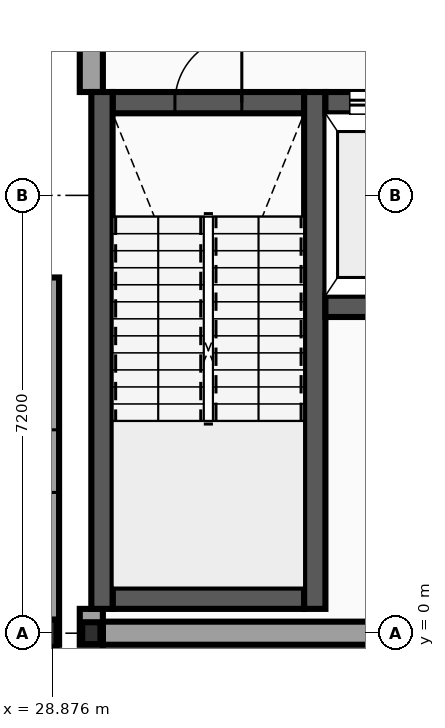
"""IFC4 building model, lengths in metres.
Left out: names, types, materials, properties, quantities, classifications, styles, units other than length and angle.
Written with IfcOpenShell. Run it as: python <this file> out.ifc"""

import sys

from ifc_helpers import new_model, si_unit, direction, frame, frame_2d, origin, origin_2d, place, context, subcontext, project, spatial, rectangle, i_section, extrude, element, fill, save


model = new_model("IFC4")
c1 = context("Model", 3, precision=1e-05, world=origin(), true_north=direction((0.0, 1.0)))
c2 = subcontext(c1, "Body", "Model", "MODEL_VIEW")
j1 = project(units=[si_unit("LENGTHUNIT", "METRE"), si_unit("PLANEANGLEUNIT", "RADIAN")], contexts=[c1])
p1 = place(None, origin())
s1 = spatial("IfcSite", under=j1, at=p1, CompositionType="ELEMENT")
p2 = place(p1, origin())
s2 = spatial("IfcBuilding", under=s1, at=p2, CompositionType="ELEMENT")
p3 = place(p2, frame((0.0, 0.0, 9.6)))
s3 = spatial("IfcBuildingStorey", under=s2, at=p3, CompositionType="ELEMENT", Elevation=9.6)
p4 = place(p3, frame((28.8, 0.0, 0.0), z_axis=(0.0, 0.0, 1.0), x_axis=(1.0, 0.0, 0.0)))
e1 = element("IfcColumn", 1, at=p4, inside=s3, PredefinedType="COLUMN", context=c2, shape_type="SweptSolid", body=[
    extrude(i_section(OverallWidth=0.3, OverallDepth=0.45, WebThickness=0.014, FlangeThickness=0.026, FilletRadius=0.027, at=origin_2d()), origin(), (0.0, 0.0, 1.0), 4.4),
])
p5 = place(p3, frame((29.52, 0.0, 0.0), z_axis=(0.0, 0.0, 1.0), x_axis=(1.0, 0.0, 0.0)))
e2 = element("IfcColumn", 2, at=p5, inside=s3, PredefinedType="COLUMN", context=c2, shape_type="SweptSolid", body=[
    extrude(i_section(OverallWidth=0.3, OverallDepth=0.36, WebThickness=0.012, FlangeThickness=0.022, FilletRadius=0.027, at=origin_2d()), origin(), (0.0, 0.0, 1.0), 4.4),
])
p6 = place(p3, frame((28.8, -0.19, 0.0), z_axis=(0.0, 0.0, 1.0), x_axis=(0.0, 1.0, 0.0)))
e3 = element("IfcWall", 3, at=p6, inside=s3, PredefinedType="STANDARD", context=c2, shape_type="SweptSolid", body=[
    extrude(rectangle(XDim=6.04, YDim=0.38, at=frame_2d((3.02, 0.0))), origin(), (0.0, 0.0, 1.0), 4.2),
])
p7 = place(p6, frame((2.505, 0.0, 0.95)))
e4 = element("IfcOpeningElement", 4, at=p7, cuts=e3, PredefinedType="OPENING", context=c2, shape_type="SweptSolid", body=[
    extrude(rectangle(XDim=1.03, YDim=1.332, at=frame_2d((0.515, 0.666))), frame((0.0, 0.2, 0.0), z_axis=(0.0, -1.0, 0.0), x_axis=(1.0, 0.0, 0.0)), (0.0, 0.0, 1.0), 0.4),
])
p8 = place(p3, frame((29.71, 0.0, 0.0), z_axis=(0.0, 0.0, 1.0), x_axis=(1.0, 0.0, 0.0)))
e5 = element("IfcWall", 5, at=p8, inside=s3, PredefinedType="STANDARD", context=c2, shape_type="SweptSolid", body=[
    extrude(rectangle(XDim=6.4, YDim=0.38, at=frame_2d((3.2, 0.0))), origin(), (0.0, 0.0, 1.0), 3.895),
])
p9 = place(p3, frame((29.52, 0.4, 0.0), z_axis=(0.0, 0.0, 1.0), x_axis=(0.0, -1.0, 0.0)))
e6 = element("IfcWall", 6, at=p9, inside=s3, PredefinedType="STANDARD", context=c2, shape_type="SweptSolid", body=[
    extrude(rectangle(XDim=0.59, YDim=0.38, at=frame_2d((0.295, 0.0))), origin(), (0.0, 0.0, 1.0), 4.2),
])
p10 = place(p3, frame((29.52, 14.4, 0.0), z_axis=(0.0, 0.0, 1.0), x_axis=(0.0, -1.0, 0.0)))
e7 = element("IfcWall", 7, at=p10, inside=s3, PredefinedType="STANDARD", context=c2, shape_type="SweptSolid", body=[
    extrude(rectangle(XDim=5.5, YDim=0.38, at=frame_2d((2.75, 0.0))), origin(), (0.0, 0.0, 1.0), 4.2),
])
p11 = place(p3, frame((29.87, 0.575, 0.0), z_axis=(0.0, 0.0, 1.0), x_axis=(1.0, 0.0, 0.0)))
e8 = element("IfcWall", 8, at=p11, inside=s3, PredefinedType="SHEAR", context=c2, shape_type="SweptSolid", body=[
    extrude(rectangle(XDim=3.15, YDim=0.35, at=frame_2d((1.575, 0.0))), origin(), (0.0, 0.0, 1.0), 4.2),
])
p12 = place(p3, frame((29.87, 8.725, 0.0), z_axis=(0.0, 0.0, 1.0), x_axis=(1.0, 0.0, 0.0)))
e9 = element("IfcWall", 9, at=p12, inside=s3, PredefinedType="SHEAR", context=c2, shape_type="SweptSolid", body=[
    extrude(rectangle(XDim=3.15, YDim=0.35, at=frame_2d((1.575, 0.0))), origin(), (0.0, 0.0, 1.0), 4.2),
])
p13 = place(p12, frame((1.025, 0.0, 0.0)))
e10 = element("IfcOpeningElement", 10, at=p13, cuts=e9, PredefinedType="OPENING", context=c2, shape_type="SweptSolid", body=[
    extrude(rectangle(XDim=1.1, YDim=2.15, at=frame_2d((0.55, 1.075))), frame((0.0, 0.185, 0.0), z_axis=(0.0, -1.0, 0.0), x_axis=(1.0, 0.0, 0.0)), (0.0, 0.0, 1.0), 0.37),
])
for number, where, z_axis, x_axis in (
    (11, (29.695, 0.4, 0.0), (0.0, 0.0, 1.0), (0.0, 1.0, 0.0)),
    (12, (33.195, 0.4, 0.0), (0.0, 0.0, 1.0), (0.0, 1.0, 0.0)),
):
    element("IfcWall", number, at=place(p3, frame(where, z_axis=z_axis, x_axis=x_axis)), inside=s3, PredefinedType="SHEAR", context=c2, shape_type="SweptSolid", body=[
        extrude(rectangle(XDim=8.5, YDim=0.35, at=frame_2d((4.25, 0.0))), origin(), (0.0, 0.0, 1.0), 4.2),
    ])
p14 = place(p3, frame((33.37, 5.375, 0.0), z_axis=(0.0, 0.0, 1.0), x_axis=(1.0, 0.0, 0.0)))
e13 = element("IfcWall", 13, at=p14, inside=s3, PredefinedType="SHEAR", context=c2, shape_type="SweptSolid", body=[
    extrude(rectangle(XDim=2.0, YDim=0.35, at=frame_2d((1.0, 0.0))), origin(), (0.0, 0.0, 1.0), 4.2),
])
p15 = place(p3, frame((33.37, 8.725, 0.0), z_axis=(0.0, 0.0, 1.0), x_axis=(1.0, 0.0, 0.0)))
e14 = element("IfcWall", 14, at=p15, inside=s3, PredefinedType="SHEAR", context=c2, shape_type="SweptSolid", body=[
    extrude(rectangle(XDim=2.0, YDim=0.35, at=frame_2d((1.0, 0.0))), origin(), (0.0, 0.0, 1.0), 4.2),
])
p16 = place(p15, frame((0.4, 0.0, 0.0)))
e15 = element("IfcOpeningElement", 15, at=p16, cuts=e14, PredefinedType="OPENING", context=c2, shape_type="SweptSolid", body=[
    extrude(rectangle(XDim=1.2, YDim=2.2, at=frame_2d((0.6, 1.1))), frame((0.0, 0.185, 0.0), z_axis=(0.0, -1.0, 0.0), x_axis=(1.0, 0.0, 0.0)), (0.0, 0.0, 1.0), 0.37),
])
p17 = place(p13, frame((1.1, 0.0, 0.0), z_axis=(0.0, 0.0, 1.0), x_axis=(-1.0, 0.0, 0.0)))
e16 = element("IfcDoor", 16, at=p17, inside=s3, OperationType="SINGLE_SWING_RIGHT", PredefinedType="DOOR", context=c2, shape_type="SweptSolid", body=[
    extrude(rectangle(XDim=1.1, YDim=2.15, at=frame_2d((0.55, 1.075))), frame((0.0, 0.025, 0.0), z_axis=(0.0, -1.0, 0.0), x_axis=(1.0, 0.0, 0.0)), (0.0, 0.0, 1.0), 0.05),
])
fill(e10, e16)
p18 = place(p16, origin())
e17 = element("IfcDoor", 17, at=p18, inside=s3, OperationType="SLIDING_TO_RIGHT", PredefinedType="DOOR", context=c2, shape_type="SweptSolid", body=[
    extrude(rectangle(XDim=1.2, YDim=2.2, at=frame_2d((0.6, 1.1))), frame((0.0, 0.025, 0.0), z_axis=(0.0, -1.0, 0.0), x_axis=(1.0, 0.0, 0.0)), (0.0, 0.0, 1.0), 0.05),
])
fill(e15, e17)
save(model, sys.argv[1])
